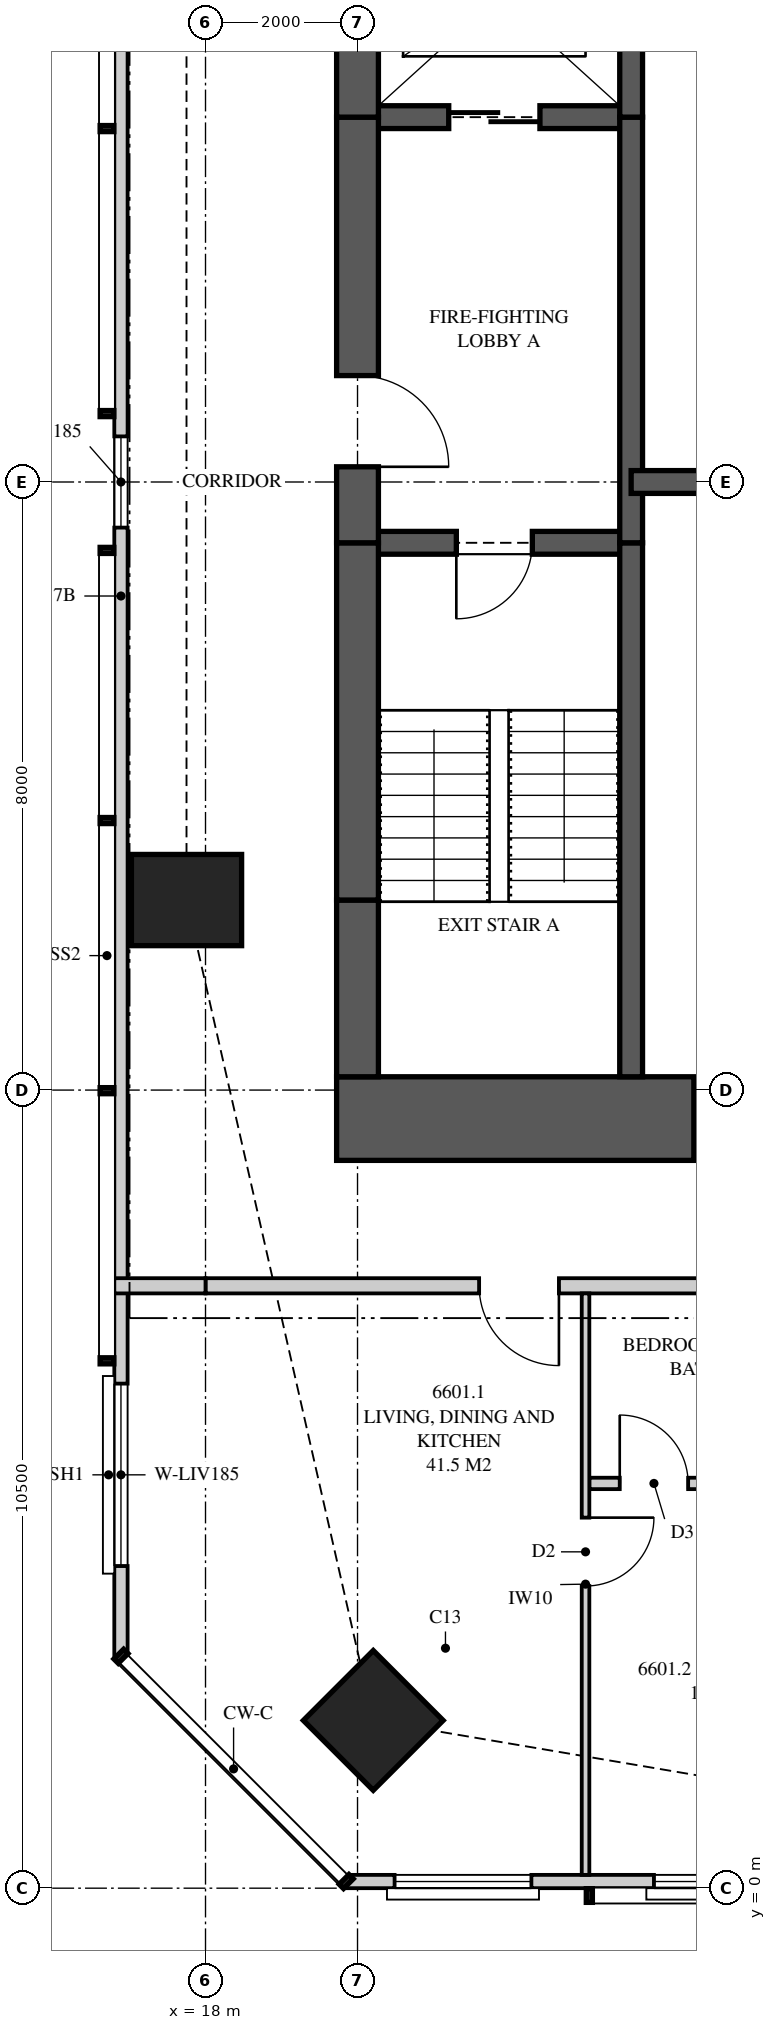
"""IFC4 building model, lengths in metres.
Left out: names, types, materials, properties, quantities, classifications, styles, units other than length and angle.
Written with IfcOpenShell. Run it as: python <this file> out.ifc"""

import sys

from ifc_helpers import new_model, si_unit, direction, frame, frame_2d, origin, origin_2d, place, context, subcontext, project, spatial, polyline, rectangle, outline, extrude, element, fill, save


model = new_model("IFC4")
c1 = context("Model", 3, precision=1e-05, world=origin(), true_north=direction((0.0, 1.0)))
c2 = subcontext(c1, "Body", "Model", "MODEL_VIEW")
j1 = project(units=[si_unit("LENGTHUNIT", "METRE"), si_unit("PLANEANGLEUNIT", "RADIAN")], contexts=[c1])
p1 = place(None, origin())
s1 = spatial("IfcSite", under=j1, at=p1, CompositionType="ELEMENT")
p2 = place(p1, origin())
s2 = spatial("IfcBuilding", under=s1, at=p2, CompositionType="ELEMENT")
p3 = place(p2, frame((0.0, 0.0, 242.45)))
s3 = spatial("IfcBuildingStorey", under=s2, at=p3, CompositionType="ELEMENT", Elevation=242.45)
p4 = place(p3, frame((20.207, 2.207, 0.0), z_axis=(0.0, 0.0, 1.0), x_axis=(0.707106781187, 0.707106781187, 0.0)))
e1 = element("IfcColumn", 1, at=p4, inside=s3, PredefinedType="COLUMN", context=c2, shape_type="SweptSolid", body=[
    extrude(rectangle(XDim=1.3, YDim=1.3, at=origin_2d()), origin(), (0.0, 0.0, 1.0), 3.5),
])
p5 = place(p3, frame((17.75, 13.0, 0.0), z_axis=(0.0, 0.0, 1.0), x_axis=(1.0, 0.0, 0.0)))
e2 = element("IfcColumn", 2, at=p5, inside=s3, PredefinedType="COLUMN", context=c2, shape_type="SweptSolid", body=[
    extrude(rectangle(XDim=1.45, YDim=1.2, at=origin_2d()), origin(), (0.0, 0.0, 1.0), 3.5),
])
p6 = place(p3, frame((19.725, 10.125, 0.0), z_axis=(0.0, 0.0, 1.0), x_axis=(1.0, 0.0, 0.0)))
e3 = element("IfcWall", 3, at=p6, inside=s3, PredefinedType="SHEAR", context=c2, shape_type="SweptSolid", body=[
    extrude(rectangle(XDim=6.275, YDim=1.1, at=frame_2d((3.137, 0.0))), origin(), (0.0, 0.0, 1.0), 3.5),
])
p7 = place(p6, frame((4.7, 0.0, 0.0)))
e4 = element("IfcOpeningElement", 4, at=p7, cuts=e3, PredefinedType="OPENING", context=c2, shape_type="SweptSolid", body=[
    extrude(rectangle(XDim=0.75, YDim=2.1, at=frame_2d((0.375, 1.05))), frame((0.0, 0.56, 0.0), z_axis=(0.0, -1.0, 0.0), x_axis=(1.0, 0.0, 0.0)), (0.0, 0.0, 1.0), 1.12),
])
p8 = place(p3, frame((20.0, 26.325, 0.0), z_axis=(0.0, 0.0, 1.0), x_axis=(0.0, -1.0, 0.0)))
e5 = element("IfcWall", 5, at=p8, inside=s3, PredefinedType="SHEAR", context=c2, shape_type="SweptSolid", body=[
    extrude(rectangle(XDim=3.025, YDim=0.55, at=frame_2d((1.512, 0.0))), origin(), (0.0, 0.0, 1.0), 3.5),
])
p9 = place(p3, frame((20.0, 23.3, 0.0), z_axis=(0.0, 0.0, 1.0), x_axis=(0.0, -1.0, 0.0)))
e6 = element("IfcWall", 6, at=p9, inside=s3, PredefinedType="SHEAR", context=c2, shape_type="SweptSolid", body=[
    extrude(rectangle(XDim=5.6, YDim=0.55, at=frame_2d((2.8, 0.0))), origin(), (0.0, 0.0, 1.0), 3.5),
])
p10 = place(p9, frame((3.4, 0.0, 0.0)))
e7 = element("IfcOpeningElement", 7, at=p10, cuts=e6, PredefinedType="OPENING", context=c2, shape_type="SweptSolid", body=[
    extrude(rectangle(XDim=1.2, YDim=2.2, at=frame_2d((0.6, 1.1))), frame((0.0, 0.285, 0.0), z_axis=(0.0, -1.0, 0.0), x_axis=(1.0, 0.0, 0.0)), (0.0, 0.0, 1.0), 0.57),
])
p11 = place(p3, frame((20.0, 17.7, 0.0), z_axis=(0.0, 0.0, 1.0), x_axis=(0.0, -1.0, 0.0)))
e8 = element("IfcWall", 8, at=p11, inside=s3, PredefinedType="SHEAR", context=c2, shape_type="SweptSolid", body=[
    extrude(rectangle(XDim=4.7, YDim=0.55, at=frame_2d((2.35, 0.0))), origin(), (0.0, 0.0, 1.0), 3.5),
])
p12 = place(p3, frame((20.0, 13.0, 0.0), z_axis=(0.0, 0.0, 1.0), x_axis=(0.0, -1.0, 0.0)))
e9 = element("IfcWall", 9, at=p12, inside=s3, PredefinedType="SHEAR", context=c2, shape_type="SweptSolid", body=[
    extrude(rectangle(XDim=2.325, YDim=0.55, at=frame_2d((1.163, 0.0))), origin(), (0.0, 0.0, 1.0), 3.5),
])
p13 = place(p3, frame((23.6, 10.675, 0.0), z_axis=(0.0, 0.0, 1.0), x_axis=(0.0, 1.0, 0.0)))
e10 = element("IfcWall", 10, at=p13, inside=s3, PredefinedType="SHEAR", context=c2, shape_type="SweptSolid", body=[
    extrude(rectangle(XDim=7.025, YDim=0.3, at=frame_2d((3.512, 0.0))), origin(), (0.0, 0.0, 1.0), 3.5),
])
p14 = place(p3, frame((23.6, 17.7, 0.0), z_axis=(0.0, 0.0, 1.0), x_axis=(0.0, 1.0, 0.0)))
e11 = element("IfcWall", 11, at=p14, inside=s3, PredefinedType="SHEAR", context=c2, shape_type="SweptSolid", body=[
    extrude(rectangle(XDim=5.6, YDim=0.3, at=frame_2d((2.8, 0.0))), origin(), (0.0, 0.0, 1.0), 3.5),
])
p15 = place(p3, frame((23.6, 23.3, 0.0), z_axis=(0.0, 0.0, 1.0), x_axis=(0.0, 1.0, 0.0)))
e12 = element("IfcWall", 12, at=p15, inside=s3, PredefinedType="SHEAR", context=c2, shape_type="SweptSolid", body=[
    extrude(rectangle(XDim=3.025, YDim=0.3, at=frame_2d((1.512, 0.0))), origin(), (0.0, 0.0, 1.0), 3.5),
])
p16 = place(p3, frame((20.0, 17.7, 0.0), z_axis=(0.0, 0.0, 1.0), x_axis=(1.0, 0.0, 0.0)))
e13 = element("IfcWall", 13, at=p16, inside=s3, PredefinedType="SHEAR", context=c2, shape_type="SweptSolid", body=[
    extrude(rectangle(XDim=3.6, YDim=0.3, at=frame_2d((1.8, 0.0))), origin(), (0.0, 0.0, 1.0), 3.5),
])
p17 = place(p16, frame((1.3, 0.0, 0.0)))
e14 = element("IfcOpeningElement", 14, at=p17, cuts=e13, PredefinedType="OPENING", context=c2, shape_type="SweptSolid", body=[
    extrude(rectangle(XDim=1.0, YDim=2.1, at=frame_2d((0.5, 1.05))), frame((0.0, 0.16, 0.0), z_axis=(0.0, -1.0, 0.0), x_axis=(1.0, 0.0, 0.0)), (0.0, 0.0, 1.0), 0.32),
])
p18 = place(p3, frame((20.0, 23.3, 0.0), z_axis=(0.0, 0.0, 1.0), x_axis=(1.0, 0.0, 0.0)))
e15 = element("IfcWall", 15, at=p18, inside=s3, PredefinedType="SHEAR", context=c2, shape_type="SweptSolid", body=[
    extrude(rectangle(XDim=3.6, YDim=0.3, at=frame_2d((1.8, 0.0))), origin(), (0.0, 0.0, 1.0), 3.5),
])
p19 = place(p18, frame((1.2, 0.0, 0.0)))
e16 = element("IfcOpeningElement", 16, at=p19, cuts=e15, PredefinedType="OPENING", context=c2, shape_type="SweptSolid", body=[
    extrude(rectangle(XDim=1.2, YDim=2.1, at=frame_2d((0.6, 1.05))), frame((0.0, 0.16, 0.0), z_axis=(0.0, -1.0, 0.0), x_axis=(1.0, 0.0, 0.0)), (0.0, 0.0, 1.0), 0.32),
])
p20 = place(p3, frame((23.6, 18.5, 0.0), z_axis=(0.0, 0.0, 1.0), x_axis=(1.0, 0.0, 0.0)))
e17 = element("IfcWall", 17, at=p20, inside=s3, PredefinedType="SHEAR", context=c2, shape_type="SweptSolid", body=[
    extrude(rectangle(XDim=2.4, YDim=0.3, at=frame_2d((1.2, 0.0))), origin(), (0.0, 0.0, 1.0), 3.5),
])
p21 = place(p3, frame((19.851, 0.087, 0.0), z_axis=(0.0, 0.0, 1.0), x_axis=(1.0, 0.0, 0.0)))
e18 = element("IfcWall", 18, at=p21, inside=s3, PredefinedType="SOLIDWALL", context=c2, shape_type="SweptSolid", body=[
    extrude(outline(polyline([(0.0, 0.0), (13.049, 0.0), (13.049, 2.3), (7.774, 2.3), (7.774, 3.26), (7.642, 3.26), (7.642, 2.3), (7.559, 2.3), (7.559, 3.26), (0.0, 3.26), (0.0, 0.0)])), frame((0.0, 0.087, 0.0), z_axis=(0.0, -1.0, 0.0), x_axis=(1.0, 0.0, 0.0)), (0.0, 0.0, 1.0), 0.175),
])
p22 = place(p21, frame((0.636, 0.0, 0.4)))
e19 = element("IfcOpeningElement", 19, at=p22, cuts=e18, PredefinedType="OPENING", context=c2, shape_type="SweptSolid", body=[
    extrude(rectangle(XDim=1.8, YDim=1.85, at=frame_2d((0.9, 0.925))), frame((0.0, 0.097, 0.0), z_axis=(0.0, -1.0, 0.0), x_axis=(1.0, 0.0, 0.0)), (0.0, 0.0, 1.0), 0.195),
])
p23 = place(p21, frame((4.049, 0.0, 0.4)))
e20 = element("IfcOpeningElement", 20, at=p23, cuts=e18, PredefinedType="OPENING", context=c2, shape_type="SweptSolid", body=[
    extrude(rectangle(XDim=1.8, YDim=1.85, at=frame_2d((0.9, 0.925))), frame((0.0, 0.097, 0.0), z_axis=(0.0, -1.0, 0.0), x_axis=(1.0, 0.0, 0.0)), (0.0, 0.0, 1.0), 0.195),
])
p24 = place(p21, frame((8.699, 0.0, 0.4)))
e21 = element("IfcOpeningElement", 21, at=p24, cuts=e18, PredefinedType="OPENING", context=c2, shape_type="SweptSolid", body=[
    extrude(rectangle(XDim=2.4, YDim=1.85, at=frame_2d((1.2, 0.925))), frame((0.0, 0.097, 0.0), z_axis=(0.0, -1.0, 0.0), x_axis=(1.0, 0.0, 0.0)), (0.0, 0.0, 1.0), 0.195),
])
p25 = place(p3, frame((16.887, 30.949, 0.0), z_axis=(0.0, 0.0, 1.0), x_axis=(0.0, -1.0, 0.0)))
e22 = element("IfcWall", 22, at=p25, inside=s3, PredefinedType="SOLIDWALL", context=c2, shape_type="SweptSolid", body=[
    extrude(outline(polyline([(0.0, 0.0), (27.897, 0.0), (27.897, 3.26), (18.148, 3.26), (18.148, 2.3), (18.125, 2.3), (18.125, 3.26), (17.949, 3.26), (17.949, 2.3), (5.949, 2.3), (5.949, 3.26), (0.0, 3.26), (0.0, 0.0)])), frame((0.0, 0.087, 0.0), z_axis=(0.0, -1.0, 0.0), x_axis=(1.0, 0.0, 0.0)), (0.0, 0.0, 1.0), 0.175),
])
p26 = place(p25, frame((11.849, 0.0, 0.4)))
e23 = element("IfcOpeningElement", 23, at=p26, cuts=e22, PredefinedType="OPENING", context=c2, shape_type="SweptSolid", body=[
    extrude(rectangle(XDim=1.2, YDim=1.85, at=frame_2d((0.6, 0.925))), frame((0.0, 0.097, 0.0), z_axis=(0.0, -1.0, 0.0), x_axis=(1.0, 0.0, 0.0)), (0.0, 0.0, 1.0), 0.195),
])
p27 = place(p25, frame((24.311, 0.0, 0.4)))
e24 = element("IfcOpeningElement", 24, at=p27, cuts=e22, PredefinedType="OPENING", context=c2, shape_type="SweptSolid", body=[
    extrude(rectangle(XDim=2.4, YDim=1.85, at=frame_2d((1.2, 0.925))), frame((0.0, 0.097, 0.0), z_axis=(0.0, -1.0, 0.0), x_axis=(1.0, 0.0, 0.0)), (0.0, 0.0, 1.0), 0.195),
])
p28 = place(p3, frame((18.0, 7.925, 0.0), z_axis=(0.0, 0.0, 1.0), x_axis=(1.0, 0.0, 0.0)))
e25 = element("IfcWall", 25, at=p28, inside=s3, PredefinedType="PARTITIONING", context=c2, shape_type="SweptSolid", body=[
    extrude(outline(polyline([(0.0, 0.0), (8.5, 0.0), (8.5, 3.26), (8.5, 2.66), (8.315, 2.66), (8.315, 3.26), (1.839, 3.26), (1.839, 2.3), (0.0, 2.3), (0.0, 3.26), (0.0, 0.0)])), frame((0.0, 0.1, 0.0), z_axis=(0.0, -1.0, 0.0), x_axis=(1.0, 0.0, 0.0)), (0.0, 0.0, 1.0), 0.2),
])
p29 = place(p28, frame((3.6, 0.0, 0.0)))
e26 = element("IfcOpeningElement", 26, at=p29, cuts=e25, PredefinedType="OPENING", context=c2, shape_type="SweptSolid", body=[
    extrude(rectangle(XDim=1.05, YDim=2.2, at=frame_2d((0.525, 1.1))), frame((0.0, 0.11, 0.0), z_axis=(0.0, -1.0, 0.0), x_axis=(1.0, 0.0, 0.0)), (0.0, 0.0, 1.0), 0.22),
])
p30 = place(p3, frame((23.0, 0.175, 0.0), z_axis=(0.0, 0.0, 1.0), x_axis=(0.0, 1.0, 0.0)))
e27 = element("IfcWall", 27, at=p30, inside=s3, PredefinedType="PARTITIONING", context=c2, shape_type="SweptSolid", body=[
    extrude(outline(polyline([(0.0, 0.0), (7.65, 0.0), (7.65, 3.26), (2.431, 3.26), (2.431, 2.3), (0.687, 2.3), (0.687, 3.26), (0.0, 3.26), (0.0, 0.0)])), frame((0.0, 0.05, 0.0), z_axis=(0.0, -1.0, 0.0), x_axis=(1.0, 0.0, 0.0)), (0.0, 0.0, 1.0), 0.1),
])
p31 = place(p30, frame((3.8, 0.0, 0.0)))
e28 = element("IfcOpeningElement", 28, at=p31, cuts=e27, PredefinedType="OPENING", context=c2, shape_type="SweptSolid", body=[
    extrude(rectangle(XDim=0.9, YDim=2.1, at=frame_2d((0.45, 1.05))), frame((0.0, 0.06, 0.0), z_axis=(0.0, -1.0, 0.0), x_axis=(1.0, 0.0, 0.0)), (0.0, 0.0, 1.0), 0.12),
])
p32 = place(p3, frame((23.05, 5.325, 0.0), z_axis=(0.0, 0.0, 1.0), x_axis=(1.0, 0.0, 0.0)))
e29 = element("IfcWall", 29, at=p32, inside=s3, PredefinedType="PLUMBINGWALL", context=c2, shape_type="SweptSolid", body=[
    extrude(outline(polyline([(0.0, 0.0), (3.45, 0.0), (3.45, 3.26), (3.45, 2.66), (3.29, 2.66), (3.29, 3.26), (0.0, 3.26), (0.0, 0.0)])), frame((0.0, 0.075, 0.0), z_axis=(0.0, -1.0, 0.0), x_axis=(1.0, 0.0, 0.0)), (0.0, 0.0, 1.0), 0.15),
])
p33 = place(p32, frame((0.4, 0.0, 0.0)))
e30 = element("IfcOpeningElement", 30, at=p33, cuts=e29, PredefinedType="OPENING", context=c2, shape_type="SweptSolid", body=[
    extrude(rectangle(XDim=0.9, YDim=2.1, at=frame_2d((0.45, 1.05))), frame((0.0, 0.085, 0.0), z_axis=(0.0, -1.0, 0.0), x_axis=(1.0, 0.0, 0.0)), (0.0, 0.0, 1.0), 0.17),
])
p34 = place(p3, frame((16.8, 7.925, 0.0), z_axis=(0.0, 0.0, 1.0), x_axis=(1.0, 0.0, 0.0)))
e31 = element("IfcWall", 31, at=p34, inside=s3, PredefinedType="PARTITIONING", context=c2, shape_type="SweptSolid", body=[
    extrude(outline(polyline([(0.0, 0.0), (1.2, 0.0), (1.2, 3.26), (1.2, 2.3), (1.172, 2.3), (1.172, 3.26), (0.0, 3.26), (0.0, 0.0)])), frame((0.0, 0.1, 0.0), z_axis=(0.0, -1.0, 0.0), x_axis=(1.0, 0.0, 0.0)), (0.0, 0.0, 1.0), 0.2),
])
p35 = place(p22, origin())
e32 = element("IfcWindow", 32, at=p35, inside=s3, PartitioningType="SINGLE_PANEL", PredefinedType="WINDOW", context=c2, shape_type="SweptSolid", body=[
    extrude(rectangle(XDim=1.8, YDim=1.85, at=frame_2d((0.9, 0.925))), frame((0.0, 0.03, 0.0), z_axis=(0.0, -1.0, 0.0), x_axis=(1.0, 0.0, 0.0)), (0.0, 0.0, 1.0), 0.06),
])
fill(e19, e32)
p36 = place(p23, origin())
e33 = element("IfcWindow", 33, at=p36, inside=s3, PartitioningType="SINGLE_PANEL", PredefinedType="WINDOW", context=c2, shape_type="SweptSolid", body=[
    extrude(rectangle(XDim=1.8, YDim=1.85, at=frame_2d((0.9, 0.925))), frame((0.0, 0.03, 0.0), z_axis=(0.0, -1.0, 0.0), x_axis=(1.0, 0.0, 0.0)), (0.0, 0.0, 1.0), 0.06),
])
fill(e20, e33)
p37 = place(p26, origin())
e34 = element("IfcWindow", 34, at=p37, inside=s3, PartitioningType="SINGLE_PANEL", PredefinedType="WINDOW", context=c2, shape_type="SweptSolid", body=[
    extrude(rectangle(XDim=1.2, YDim=1.85, at=frame_2d((0.6, 0.925))), frame((0.0, 0.03, 0.0), z_axis=(0.0, -1.0, 0.0), x_axis=(1.0, 0.0, 0.0)), (0.0, 0.0, 1.0), 0.06),
])
fill(e23, e34)
p38 = place(p27, origin())
e35 = element("IfcWindow", 35, at=p38, inside=s3, PartitioningType="SINGLE_PANEL", PredefinedType="WINDOW", context=c2, shape_type="SweptSolid", body=[
    extrude(rectangle(XDim=2.4, YDim=1.85, at=frame_2d((1.2, 0.925))), frame((0.0, 0.03, 0.0), z_axis=(0.0, -1.0, 0.0), x_axis=(1.0, 0.0, 0.0)), (0.0, 0.0, 1.0), 0.06),
])
fill(e24, e35)
p39 = place(p29, frame((1.05, 0.0, 0.0), z_axis=(0.0, 0.0, 1.0), x_axis=(-1.0, 0.0, 0.0)))
e36 = element("IfcDoor", 36, at=p39, inside=s3, OperationType="SINGLE_SWING_LEFT", PredefinedType="DOOR", context=c2, shape_type="SweptSolid", body=[
    extrude(rectangle(XDim=1.05, YDim=2.2, at=frame_2d((0.525, 1.1))), frame((0.0, 0.025, 0.0), z_axis=(0.0, -1.0, 0.0), x_axis=(1.0, 0.0, 0.0)), (0.0, 0.0, 1.0), 0.05),
])
fill(e26, e36)
p40 = place(p31, frame((0.9, 0.0, 0.0), z_axis=(0.0, 0.0, 1.0), x_axis=(-1.0, 0.0, 0.0)))
e37 = element("IfcDoor", 37, at=p40, inside=s3, OperationType="SINGLE_SWING_LEFT", PredefinedType="DOOR", context=c2, shape_type="SweptSolid", body=[
    extrude(rectangle(XDim=0.9, YDim=2.1, at=frame_2d((0.45, 1.05))), frame((0.0, 0.025, 0.0), z_axis=(0.0, -1.0, 0.0), x_axis=(1.0, 0.0, 0.0)), (0.0, 0.0, 1.0), 0.05),
])
fill(e28, e37)
p41 = place(p33, origin())
e38 = element("IfcDoor", 38, at=p41, inside=s3, OperationType="SINGLE_SWING_LEFT", PredefinedType="DOOR", context=c2, shape_type="SweptSolid", body=[
    extrude(rectangle(XDim=0.9, YDim=2.1, at=frame_2d((0.45, 1.05))), frame((0.0, 0.025, 0.0), z_axis=(0.0, -1.0, 0.0), x_axis=(1.0, 0.0, 0.0)), (0.0, 0.0, 1.0), 0.05),
])
fill(e30, e38)
p42 = place(p17, frame((1.0, 0.0, 0.0), z_axis=(0.0, 0.0, 1.0), x_axis=(-1.0, 0.0, 0.0)))
e39 = element("IfcDoor", 39, at=p42, inside=s3, OperationType="SINGLE_SWING_RIGHT", PredefinedType="DOOR", context=c2, shape_type="SweptSolid", body=[
    extrude(rectangle(XDim=1.0, YDim=2.1, at=frame_2d((0.5, 1.05))), frame((0.0, 0.025, 0.0), z_axis=(0.0, -1.0, 0.0), x_axis=(1.0, 0.0, 0.0)), (0.0, 0.0, 1.0), 0.05),
])
fill(e14, e39)
p43 = place(p10, origin())
e40 = element("IfcDoor", 40, at=p43, inside=s3, OperationType="SINGLE_SWING_RIGHT", PredefinedType="DOOR", context=c2, shape_type="SweptSolid", body=[
    extrude(rectangle(XDim=1.2, YDim=2.2, at=frame_2d((0.6, 1.1))), frame((0.0, 0.025, 0.0), z_axis=(0.0, -1.0, 0.0), x_axis=(1.0, 0.0, 0.0)), (0.0, 0.0, 1.0), 0.05),
])
fill(e7, e40)
p44 = place(p19, origin())
e41 = element("IfcDoor", 41, at=p44, inside=s3, OperationType="SLIDING_TO_LEFT", PredefinedType="DOOR", context=c2, shape_type="SweptSolid", body=[
    extrude(rectangle(XDim=1.2, YDim=2.1, at=frame_2d((0.6, 1.05))), frame((0.0, 0.025, 0.0), z_axis=(0.0, -1.0, 0.0), x_axis=(1.0, 0.0, 0.0)), (0.0, 0.0, 1.0), 0.05),
])
fill(e16, e41)
p45 = place(p7, origin())
e42 = element("IfcDoor", 42, at=p45, inside=s3, OperationType="SINGLE_SWING_RIGHT", PredefinedType="DOOR", context=c2, shape_type="SweptSolid", body=[
    extrude(rectangle(XDim=0.75, YDim=2.1, at=frame_2d((0.375, 1.05))), frame((0.0, 0.025, 0.0), z_axis=(0.0, -1.0, 0.0), x_axis=(1.0, 0.0, 0.0)), (0.0, 0.0, 1.0), 0.05),
])
fill(e4, e42)
save(model, sys.argv[1])
